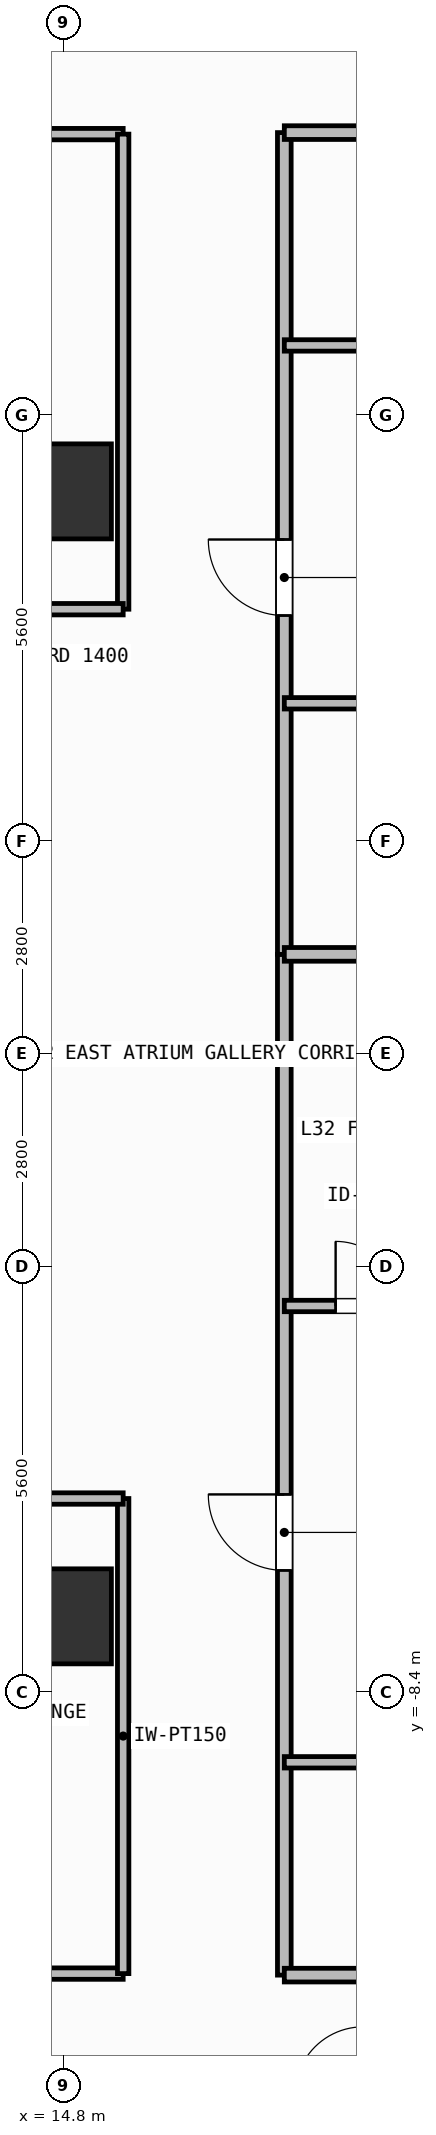
"""IFC4 building model, lengths in metres.
Left out: names, types, materials, properties, quantities, classifications, styles, units other than length and angle.
Written with IfcOpenShell. Run it as: python <this file> out.ifc"""

import sys

from ifc_helpers import new_model, si_unit, direction, frame, frame_2d, origin, origin_2d, place, context, subcontext, project, spatial, rectangle, extrude, element, fill, save


model = new_model("IFC4")
c1 = context("Model", 3, precision=1e-05, world=origin(), true_north=direction((0.0, 1.0)))
c2 = subcontext(c1, "Body", "Model", "MODEL_VIEW")
j1 = project(units=[si_unit("LENGTHUNIT", "METRE"), si_unit("PLANEANGLEUNIT", "RADIAN")], contexts=[c1])
p1 = place(None, origin())
s1 = spatial("IfcSite", under=j1, at=p1, CompositionType="ELEMENT")
p2 = place(p1, origin())
s2 = spatial("IfcBuilding", under=s1, at=p2, CompositionType="ELEMENT")
p3 = place(p2, frame((0.0, 0.0, 129.0)))
s3 = spatial("IfcBuildingStorey", under=s2, at=p3, CompositionType="ELEMENT", Elevation=129.0)
for number, where, z_axis, x_axis in (
    (1, (14.8, -7.4, 0.0), (0.0, 0.0, 1.0), (1.0, 0.0, 0.0)),
    (2, (14.8, 7.4, 0.0), (0.0, 0.0, 1.0), (1.0, 0.0, 0.0)),
):
    element("IfcColumn", number, at=place(p3, frame(where, z_axis=z_axis, x_axis=x_axis)), inside=s3, PredefinedType="COLUMN", context=c2, shape_type="SweptSolid", body=[
        extrude(rectangle(XDim=1.25, YDim=1.25, at=origin_2d()), origin(), (0.0, 0.0, 1.0), 3.9),
    ])
p4 = place(p3, frame((10.1, -12.1, 0.0), z_axis=(0.0, 0.0, 1.0), x_axis=(1.0, 0.0, 0.0)))
e3 = element("IfcWall", 3, at=p4, inside=s3, PredefinedType="PARTITIONING", context=c2, shape_type="SweptSolid", body=[
    extrude(rectangle(XDim=5.48, YDim=0.15, at=frame_2d((2.74, 0.0))), origin(), (0.0, 0.0, 1.0), 3.68),
])
p5 = place(p4, frame((2.29, 0.0, 0.0)))
e4 = element("IfcOpeningElement", 4, at=p5, cuts=e3, PredefinedType="OPENING", context=c2, shape_type="SweptSolid", body=[
    extrude(rectangle(XDim=0.9, YDim=2.1, at=frame_2d((0.45, 1.05))), frame((0.0, 0.085, 0.0), z_axis=(0.0, -1.0, 0.0), x_axis=(1.0, 0.0, 0.0)), (0.0, 0.0, 1.0), 0.17),
])
p6 = place(p3, frame((8.36, 12.1, 0.0), z_axis=(0.0, 0.0, 1.0), x_axis=(1.0, 0.0, 0.0)))
e5 = element("IfcWall", 5, at=p6, inside=s3, PredefinedType="PARTITIONING", context=c2, shape_type="SweptSolid", body=[
    extrude(rectangle(XDim=7.22, YDim=0.15, at=frame_2d((3.61, 0.0))), origin(), (0.0, 0.0, 1.0), 3.68),
])
p7 = place(p6, frame((3.513, 0.0, 0.0)))
e6 = element("IfcOpeningElement", 6, at=p7, cuts=e5, PredefinedType="OPENING", context=c2, shape_type="SweptSolid", body=[
    extrude(rectangle(XDim=0.9, YDim=2.1, at=frame_2d((0.45, 1.05))), frame((0.0, 0.085, 0.0), z_axis=(0.0, -1.0, 0.0), x_axis=(1.0, 0.0, 0.0)), (0.0, 0.0, 1.0), 0.17),
])
p8 = place(p3, frame((17.7, -12.12, 0.0), z_axis=(0.0, 0.0, 1.0), x_axis=(0.0, 1.0, 0.0)))
e7 = element("IfcWall", 7, at=p8, inside=s3, PredefinedType="PARTITIONING", context=c2, shape_type="SweptSolid", body=[
    extrude(rectangle(XDim=13.429, YDim=0.18, at=frame_2d((6.715, 0.0))), origin(), (0.0, 0.0, 1.0), 3.68),
])
p9 = place(p8, frame((5.324, 0.0, 0.0)))
e8 = element("IfcOpeningElement", 8, at=p9, cuts=e7, PredefinedType="OPENING", context=c2, shape_type="SweptSolid", body=[
    extrude(rectangle(XDim=1.0, YDim=2.2, at=frame_2d((0.5, 1.1))), frame((0.0, 0.1, 0.0), z_axis=(0.0, -1.0, 0.0), x_axis=(1.0, 0.0, 0.0)), (0.0, 0.0, 1.0), 0.2),
])
p10 = place(p3, frame((17.7, -3.317, 0.0), z_axis=(0.0, 0.0, 1.0), x_axis=(1.0, 0.0, 0.0)))
e9 = element("IfcWall", 9, at=p10, inside=s3, PredefinedType="PARTITIONING", context=c2, shape_type="SweptSolid", body=[
    extrude(rectangle(XDim=2.372, YDim=0.15, at=frame_2d((1.186, 0.0))), origin(), (0.0, 0.0, 1.0), 3.68),
])
p11 = place(p10, frame((0.675, 0.0, 0.0)))
e10 = element("IfcOpeningElement", 10, at=p11, cuts=e9, PredefinedType="OPENING", context=c2, shape_type="SweptSolid", body=[
    extrude(rectangle(XDim=0.85, YDim=2.1, at=frame_2d((0.425, 1.05))), frame((0.0, 0.085, 0.0), z_axis=(0.0, -1.0, 0.0), x_axis=(1.0, 0.0, 0.0)), (0.0, 0.0, 1.0), 0.17),
])
p12 = place(p3, frame((17.7, -9.32, 0.0), z_axis=(0.0, 0.0, 1.0), x_axis=(1.0, 0.0, 0.0)))
e11 = element("IfcWall", 11, at=p12, inside=s3, PredefinedType="PARTITIONING", context=c2, shape_type="SweptSolid", body=[
    extrude(rectangle(XDim=5.786, YDim=0.15, at=frame_2d((2.893, 0.0))), origin(), (0.0, 0.0, 1.0), 3.68),
])
p13 = place(p12, frame((2.468, 0.0, 0.0)))
e12 = element("IfcOpeningElement", 12, at=p13, cuts=e11, PredefinedType="OPENING", context=c2, shape_type="SweptSolid", body=[
    extrude(rectangle(XDim=0.85, YDim=2.1, at=frame_2d((0.425, 1.05))), frame((0.0, 0.085, 0.0), z_axis=(0.0, -1.0, 0.0), x_axis=(1.0, 0.0, 0.0)), (0.0, 0.0, 1.0), 0.17),
])
p14 = place(p3, frame((17.7, 1.309, 0.0), z_axis=(0.0, 0.0, 1.0), x_axis=(0.0, 1.0, 0.0)))
e13 = element("IfcWall", 13, at=p14, inside=s3, PredefinedType="PARTITIONING", context=c2, shape_type="SweptSolid", body=[
    extrude(rectangle(XDim=10.811, YDim=0.18, at=frame_2d((5.406, 0.0))), origin(), (0.0, 0.0, 1.0), 3.68),
])
p15 = place(p14, frame((4.458, 0.0, 0.0)))
e14 = element("IfcOpeningElement", 14, at=p15, cuts=e13, PredefinedType="OPENING", context=c2, shape_type="SweptSolid", body=[
    extrude(rectangle(XDim=1.0, YDim=2.2, at=frame_2d((0.5, 1.1))), frame((0.0, 0.1, 0.0), z_axis=(0.0, -1.0, 0.0), x_axis=(1.0, 0.0, 0.0)), (0.0, 0.0, 1.0), 0.2),
])
p16 = place(p3, frame((17.7, 9.32, 0.0), z_axis=(0.0, 0.0, 1.0), x_axis=(1.0, 0.0, 0.0)))
e15 = element("IfcWall", 15, at=p16, inside=s3, PredefinedType="PARTITIONING", context=c2, shape_type="SweptSolid", body=[
    extrude(rectangle(XDim=5.59, YDim=0.15, at=frame_2d((2.795, 0.0))), origin(), (0.0, 0.0, 1.0), 3.68),
])
p17 = place(p16, frame((2.458, 0.0, 0.0)))
e16 = element("IfcOpeningElement", 16, at=p17, cuts=e15, PredefinedType="OPENING", context=c2, shape_type="SweptSolid", body=[
    extrude(rectangle(XDim=0.85, YDim=2.1, at=frame_2d((0.425, 1.05))), frame((0.0, 0.085, 0.0), z_axis=(0.0, -1.0, 0.0), x_axis=(1.0, 0.0, 0.0)), (0.0, 0.0, 1.0), 0.17),
])
p18 = place(p3, frame((17.7, 4.612, 0.0), z_axis=(0.0, 0.0, 1.0), x_axis=(1.0, 0.0, 0.0)))
e17 = element("IfcWall", 17, at=p18, inside=s3, PredefinedType="PARTITIONING", context=c2, shape_type="SweptSolid", body=[
    extrude(rectangle(XDim=5.59, YDim=0.15, at=frame_2d((2.795, 0.0))), origin(), (0.0, 0.0, 1.0), 3.68),
])
p19 = place(p18, frame((2.281, 0.0, 0.0)))
e18 = element("IfcOpeningElement", 18, at=p19, cuts=e17, PredefinedType="OPENING", context=c2, shape_type="SweptSolid", body=[
    extrude(rectangle(XDim=0.85, YDim=2.1, at=frame_2d((0.425, 1.05))), frame((0.0, 0.085, 0.0), z_axis=(0.0, -1.0, 0.0), x_axis=(1.0, 0.0, 0.0)), (0.0, 0.0, 1.0), 0.17),
])
p20 = place(p3, frame((15.58, -12.1, 0.0), z_axis=(0.0, 0.0, 1.0), x_axis=(0.0, 1.0, 0.0)))
e19 = element("IfcWall", 19, at=p20, inside=s3, PredefinedType="PARTITIONING", context=c2, shape_type="SweptSolid", body=[
    extrude(rectangle(XDim=6.25, YDim=0.15, at=frame_2d((3.125, 0.0))), origin(), (0.0, 0.0, 1.0), 3.68),
])
p21 = place(p3, frame((8.96, -5.85, 0.0), z_axis=(0.0, 0.0, 1.0), x_axis=(1.0, 0.0, 0.0)))
e20 = element("IfcWall", 20, at=p21, inside=s3, PredefinedType="PARTITIONING", context=c2, shape_type="SweptSolid", body=[
    extrude(rectangle(XDim=6.62, YDim=0.15, at=frame_2d((3.31, 0.0))), origin(), (0.0, 0.0, 1.0), 3.68),
])
p22 = place(p3, frame((15.58, 5.85, 0.0), z_axis=(0.0, 0.0, 1.0), x_axis=(0.0, 1.0, 0.0)))
e21 = element("IfcWall", 21, at=p22, inside=s3, PredefinedType="PARTITIONING", context=c2, shape_type="SweptSolid", body=[
    extrude(rectangle(XDim=6.25, YDim=0.15, at=frame_2d((3.125, 0.0))), origin(), (0.0, 0.0, 1.0), 3.68),
])
p23 = place(p3, frame((8.96, 5.85, 0.0), z_axis=(0.0, 0.0, 1.0), x_axis=(1.0, 0.0, 0.0)))
e22 = element("IfcWall", 22, at=p23, inside=s3, PredefinedType="PARTITIONING", context=c2, shape_type="SweptSolid", body=[
    extrude(rectangle(XDim=6.62, YDim=0.15, at=frame_2d((3.31, 0.0))), origin(), (0.0, 0.0, 1.0), 3.68),
])
for number, where, z_axis, x_axis in (
    (23, (17.7, 1.309, 0.0), (0.0, 0.0, 1.0), (1.0, 0.0, 0.0)),
    (24, (17.7, -12.12, 0.0), (0.0, 0.0, 1.0), (1.0, 0.0, 0.0)),
    (25, (17.7, 12.12, 0.0), (0.0, 0.0, 1.0), (1.0, 0.0, 0.0)),
):
    element("IfcWall", number, at=place(p3, frame(where, z_axis=z_axis, x_axis=x_axis)), inside=s3, PredefinedType="PARTITIONING", context=c2, shape_type="SweptSolid", body=[
        extrude(rectangle(XDim=9.83, YDim=0.18, at=frame_2d((4.915, 0.0))), origin(), (0.0, 0.0, 1.0), 3.68),
    ])
p24 = place(p9, origin())
e26 = element("IfcDoor", 26, at=p24, inside=s3, OperationType="SINGLE_SWING_RIGHT", PredefinedType="DOOR", context=c2, shape_type="SweptSolid", body=[
    extrude(rectangle(XDim=1.0, YDim=2.2, at=frame_2d((0.5, 1.1))), frame((0.0, 0.025, 0.0), z_axis=(0.0, -1.0, 0.0), x_axis=(1.0, 0.0, 0.0)), (0.0, 0.0, 1.0), 0.05),
])
fill(e8, e26)
p25 = place(p11, origin())
e27 = element("IfcDoor", 27, at=p25, inside=s3, OperationType="SINGLE_SWING_LEFT", PredefinedType="DOOR", context=c2, shape_type="SweptSolid", body=[
    extrude(rectangle(XDim=0.85, YDim=2.1, at=frame_2d((0.425, 1.05))), frame((0.0, 0.025, 0.0), z_axis=(0.0, -1.0, 0.0), x_axis=(1.0, 0.0, 0.0)), (0.0, 0.0, 1.0), 0.05),
])
fill(e10, e27)
p26 = place(p15, origin())
e28 = element("IfcDoor", 28, at=p26, inside=s3, OperationType="SINGLE_SWING_RIGHT", PredefinedType="DOOR", context=c2, shape_type="SweptSolid", body=[
    extrude(rectangle(XDim=1.0, YDim=2.2, at=frame_2d((0.5, 1.1))), frame((0.0, 0.025, 0.0), z_axis=(0.0, -1.0, 0.0), x_axis=(1.0, 0.0, 0.0)), (0.0, 0.0, 1.0), 0.05),
])
fill(e14, e28)
save(model, sys.argv[1])
